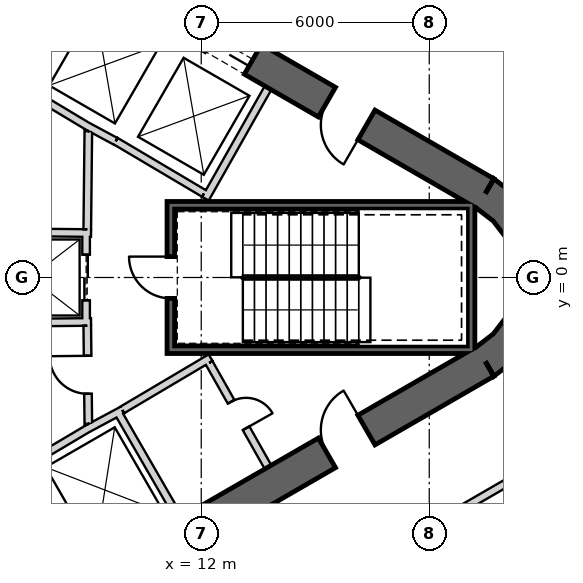
"""IFC4 building model, lengths in metres.
Left out: names, types, materials, properties, quantities, classifications, styles, units other than length and angle.
Written with IfcOpenShell. Run it as: python <this file> out.ifc"""

import sys

from ifc_helpers import new_model, si_unit, direction, frame, frame_2d, origin, place, context, subcontext, project, spatial, polyline, rectangle, outline, extrude, element, fill, save


model = new_model("IFC4")
c1 = context("Model", 3, precision=1e-05, world=origin(), true_north=direction((0.0, 1.0)))
c2 = subcontext(c1, "Body", "Model", "MODEL_VIEW")
j1 = project(units=[si_unit("LENGTHUNIT", "METRE"), si_unit("PLANEANGLEUNIT", "RADIAN")], contexts=[c1])
p1 = place(None, origin())
s1 = spatial("IfcSite", under=j1, at=p1, CompositionType="ELEMENT")
p2 = place(p1, origin())
s2 = spatial("IfcBuilding", under=s1, at=p2, CompositionType="ELEMENT")
p3 = place(p2, frame((0.0, 0.0, 119.3)))
s3 = spatial("IfcBuildingStorey", under=s2, at=p3, CompositionType="ELEMENT", Elevation=119.3)
p4 = place(p3, frame((19.475, 2.208, 0.0), z_axis=(0.0, 0.0, 1.0), x_axis=(-0.866028369851, 0.499994862586, 0.0)))
e1 = element("IfcWall", 1, at=p4, inside=s3, PredefinedType="SHEAR", context=c2, shape_type="SweptSolid", body=[
    extrude(rectangle(XDim=31.523, YDim=0.9, at=frame_2d((15.762, 0.0))), origin(), (0.0, 0.0, 1.0), 4.1),
])
p5 = place(p4, frame((7.062, 0.0, 0.0)))
e2 = element("IfcOpeningElement", 2, at=p5, cuts=e1, PredefinedType="OPENING", context=c2, shape_type="SweptSolid", body=[
    extrude(rectangle(XDim=1.2, YDim=2.4, at=frame_2d((0.6, 1.2))), frame((0.0, 0.46, 0.0), z_axis=(0.0, -1.0, 0.0), x_axis=(1.0, 0.0, 0.0)), (0.0, 0.0, 1.0), 0.92),
])
p6 = place(p4, frame((9.762, 0.0, 0.0)))
e3 = element("IfcOpeningElement", 3, at=p6, cuts=e1, PredefinedType="OPENING", context=c2, shape_type="SweptSolid", body=[
    extrude(rectangle(XDim=1.2, YDim=2.4, at=frame_2d((0.6, 1.2))), frame((0.0, 0.46, 0.0), z_axis=(0.0, -1.0, 0.0), x_axis=(1.0, 0.0, 0.0)), (0.0, 0.0, 1.0), 0.92),
])
p7 = place(p4, frame((12.462, 0.0, 0.0)))
e4 = element("IfcOpeningElement", 4, at=p7, cuts=e1, PredefinedType="OPENING", context=c2, shape_type="SweptSolid", body=[
    extrude(rectangle(XDim=1.2, YDim=2.4, at=frame_2d((0.6, 1.2))), frame((0.0, 0.46, 0.0), z_axis=(0.0, -1.0, 0.0), x_axis=(1.0, 0.0, 0.0)), (0.0, 0.0, 1.0), 0.92),
])
p8 = place(p4, frame((15.162, 0.0, 0.0)))
e5 = element("IfcOpeningElement", 5, at=p8, cuts=e1, PredefinedType="OPENING", context=c2, shape_type="SweptSolid", body=[
    extrude(rectangle(XDim=1.2, YDim=2.4, at=frame_2d((0.6, 1.2))), frame((0.0, 0.46, 0.0), z_axis=(0.0, -1.0, 0.0), x_axis=(1.0, 0.0, 0.0)), (0.0, 0.0, 1.0), 0.92),
])
p9 = place(p4, frame((17.862, 0.0, 0.0)))
e6 = element("IfcOpeningElement", 6, at=p9, cuts=e1, PredefinedType="OPENING", context=c2, shape_type="SweptSolid", body=[
    extrude(rectangle(XDim=1.2, YDim=2.4, at=frame_2d((0.6, 1.2))), frame((0.0, 0.46, 0.0), z_axis=(0.0, -1.0, 0.0), x_axis=(1.0, 0.0, 0.0)), (0.0, 0.0, 1.0), 0.92),
])
p10 = place(p4, frame((20.562, 0.0, 0.0)))
e7 = element("IfcOpeningElement", 7, at=p10, cuts=e1, PredefinedType="OPENING", context=c2, shape_type="SweptSolid", body=[
    extrude(rectangle(XDim=1.2, YDim=2.4, at=frame_2d((0.6, 1.2))), frame((0.0, 0.46, 0.0), z_axis=(0.0, -1.0, 0.0), x_axis=(1.0, 0.0, 0.0)), (0.0, 0.0, 1.0), 0.92),
])
p11 = place(p4, frame((23.262, 0.0, 0.0)))
e8 = element("IfcOpeningElement", 8, at=p11, cuts=e1, PredefinedType="OPENING", context=c2, shape_type="SweptSolid", body=[
    extrude(rectangle(XDim=1.2, YDim=2.4, at=frame_2d((0.6, 1.2))), frame((0.0, 0.46, 0.0), z_axis=(0.0, -1.0, 0.0), x_axis=(1.0, 0.0, 0.0)), (0.0, 0.0, 1.0), 0.92),
])
p12 = place(p4, frame((3.612, 0.0, 0.0)))
e9 = element("IfcOpeningElement", 9, at=p12, cuts=e1, PredefinedType="OPENING", context=c2, shape_type="SweptSolid", body=[
    extrude(rectangle(XDim=1.2, YDim=2.4, at=frame_2d((0.6, 1.2))), frame((0.0, 0.46, 0.0), z_axis=(0.0, -1.0, 0.0), x_axis=(1.0, 0.0, 0.0)), (0.0, 0.0, 1.0), 0.92),
])
p13 = place(p4, frame((26.712, 0.0, 0.0)))
e10 = element("IfcOpeningElement", 10, at=p13, cuts=e1, PredefinedType="OPENING", context=c2, shape_type="SweptSolid", body=[
    extrude(rectangle(XDim=1.2, YDim=2.4, at=frame_2d((0.6, 1.2))), frame((0.0, 0.46, 0.0), z_axis=(0.0, -1.0, 0.0), x_axis=(1.0, 0.0, 0.0)), (0.0, 0.0, 1.0), 0.92),
])
p14 = place(p3, frame((-7.825, -17.97, 0.0), z_axis=(0.0, 0.0, 1.0), x_axis=(0.866028369851, 0.499994862586, 0.0)))
e11 = element("IfcWall", 11, at=p14, inside=s3, PredefinedType="SHEAR", context=c2, shape_type="SweptSolid", body=[
    extrude(rectangle(XDim=31.523, YDim=0.9, at=frame_2d((15.762, 0.0))), origin(), (0.0, 0.0, 1.0), 4.1),
])
p15 = place(p14, frame((7.062, 0.0, 0.0)))
e12 = element("IfcOpeningElement", 12, at=p15, cuts=e11, PredefinedType="OPENING", context=c2, shape_type="SweptSolid", body=[
    extrude(rectangle(XDim=1.2, YDim=2.4, at=frame_2d((0.6, 1.2))), frame((0.0, 0.46, 0.0), z_axis=(0.0, -1.0, 0.0), x_axis=(1.0, 0.0, 0.0)), (0.0, 0.0, 1.0), 0.92),
])
p16 = place(p14, frame((9.762, 0.0, 0.0)))
e13 = element("IfcOpeningElement", 13, at=p16, cuts=e11, PredefinedType="OPENING", context=c2, shape_type="SweptSolid", body=[
    extrude(rectangle(XDim=1.2, YDim=2.4, at=frame_2d((0.6, 1.2))), frame((0.0, 0.46, 0.0), z_axis=(0.0, -1.0, 0.0), x_axis=(1.0, 0.0, 0.0)), (0.0, 0.0, 1.0), 0.92),
])
p17 = place(p14, frame((12.462, 0.0, 0.0)))
e14 = element("IfcOpeningElement", 14, at=p17, cuts=e11, PredefinedType="OPENING", context=c2, shape_type="SweptSolid", body=[
    extrude(rectangle(XDim=1.2, YDim=2.4, at=frame_2d((0.6, 1.2))), frame((0.0, 0.46, 0.0), z_axis=(0.0, -1.0, 0.0), x_axis=(1.0, 0.0, 0.0)), (0.0, 0.0, 1.0), 0.92),
])
p18 = place(p14, frame((15.162, 0.0, 0.0)))
e15 = element("IfcOpeningElement", 15, at=p18, cuts=e11, PredefinedType="OPENING", context=c2, shape_type="SweptSolid", body=[
    extrude(rectangle(XDim=1.2, YDim=2.4, at=frame_2d((0.6, 1.2))), frame((0.0, 0.46, 0.0), z_axis=(0.0, -1.0, 0.0), x_axis=(1.0, 0.0, 0.0)), (0.0, 0.0, 1.0), 0.92),
])
p19 = place(p14, frame((17.862, 0.0, 0.0)))
e16 = element("IfcOpeningElement", 16, at=p19, cuts=e11, PredefinedType="OPENING", context=c2, shape_type="SweptSolid", body=[
    extrude(rectangle(XDim=1.2, YDim=2.4, at=frame_2d((0.6, 1.2))), frame((0.0, 0.46, 0.0), z_axis=(0.0, -1.0, 0.0), x_axis=(1.0, 0.0, 0.0)), (0.0, 0.0, 1.0), 0.92),
])
p20 = place(p14, frame((20.562, 0.0, 0.0)))
e17 = element("IfcOpeningElement", 17, at=p20, cuts=e11, PredefinedType="OPENING", context=c2, shape_type="SweptSolid", body=[
    extrude(rectangle(XDim=1.2, YDim=2.4, at=frame_2d((0.6, 1.2))), frame((0.0, 0.46, 0.0), z_axis=(0.0, -1.0, 0.0), x_axis=(1.0, 0.0, 0.0)), (0.0, 0.0, 1.0), 0.92),
])
p21 = place(p14, frame((26.712, 0.0, 0.0)))
e18 = element("IfcOpeningElement", 18, at=p21, cuts=e11, PredefinedType="OPENING", context=c2, shape_type="SweptSolid", body=[
    extrude(rectangle(XDim=1.2, YDim=2.4, at=frame_2d((0.6, 1.2))), frame((0.0, 0.46, 0.0), z_axis=(0.0, -1.0, 0.0), x_axis=(1.0, 0.0, 0.0)), (0.0, 0.0, 1.0), 0.92),
])
p22 = place(p14, frame((3.612, 0.0, 0.0)))
e19 = element("IfcOpeningElement", 19, at=p22, cuts=e11, PredefinedType="OPENING", context=c2, shape_type="SweptSolid", body=[
    extrude(rectangle(XDim=1.2, YDim=2.4, at=frame_2d((0.6, 1.2))), frame((0.0, 0.46, 0.0), z_axis=(0.0, -1.0, 0.0), x_axis=(1.0, 0.0, 0.0)), (0.0, 0.0, 1.0), 0.92),
])
p23 = place(p3, origin())
e20 = element("IfcWall", 20, at=p23, inside=s3, PredefinedType="SHEAR", context=c2, shape_type="SweptSolid", body=[
    extrude(outline(polyline([(19.7, -2.598), (20.321, -2.121), (20.798, -1.5), (21.098, -0.777), (21.2, 0.0), (21.098, 0.777), (20.798, 1.5), (20.321, 2.121), (19.7, 2.598), (19.25, 1.819), (19.685, 1.485), (20.019, 1.05), (20.229, 0.543), (20.3, 0.0), (20.229, -0.543), (20.019, -1.05), (19.685, -1.485), (19.25, -1.819), (19.7, -2.598)])), origin(), (0.0, 0.0, 1.0), 4.1),
])
p24 = place(p3, frame((12.11, 2.073, 0.0), z_axis=(0.0, 0.0, 1.0), x_axis=(0.49196600604, 0.870614408852, 0.0)))
e21 = element("IfcWall", 21, at=p24, inside=s3, PredefinedType="PLUMBINGWALL", context=c2, shape_type="SweptSolid", body=[
    extrude(rectangle(XDim=3.35, YDim=0.2, at=frame_2d((1.675, 0.0))), origin(), (0.0, 0.0, 1.0), 3.8),
])
p25 = place(p3, frame((12.073, 2.211, 0.0), z_axis=(0.0, 0.0, 1.0), x_axis=(-0.860438357912, 0.509554542943, 0.0)))
e22 = element("IfcWall", 22, at=p25, inside=s3, PredefinedType="PLUMBINGWALL", context=c2, shape_type="SweptSolid", body=[
    extrude(rectangle(XDim=2.7, YDim=0.2, at=frame_2d((1.35, 0.0))), origin(), (0.0, 0.0, 1.0), 3.8),
])
p26 = place(p3, frame((9.748, 3.583, 0.0), z_axis=(0.0, 0.0, 1.0), x_axis=(-0.880917147855, 0.473270513147, 0.0)))
e23 = element("IfcWall", 23, at=p26, inside=s3, PredefinedType="PLUMBINGWALL", context=c2, shape_type="SweptSolid", body=[
    extrude(rectangle(XDim=0.878, YDim=0.2, at=frame_2d((0.439, 0.0))), origin(), (0.0, 0.0, 1.0), 3.8),
])
p27 = place(p3, frame((9.079, 3.937, 0.0), z_axis=(0.0, 0.0, 1.0), x_axis=(-0.857516281273, 0.51445682749, 0.0)))
e24 = element("IfcWall", 24, at=p27, inside=s3, PredefinedType="PLUMBINGWALL", context=c2, shape_type="SweptSolid", body=[
    extrude(rectangle(XDim=1.845, YDim=0.2, at=frame_2d((0.922, 0.0))), origin(), (0.0, 0.0, 1.0), 3.8),
])
p28 = place(p3, frame((9.795, -3.525, 0.0), z_axis=(0.0, 0.0, 1.0), x_axis=(0.499984717929, -0.866034226713, 0.0)))
e25 = element("IfcWall", 25, at=p28, inside=s3, PredefinedType="PLUMBINGWALL", context=c2, shape_type="SweptSolid", body=[
    extrude(rectangle(XDim=3.25, YDim=0.2, at=frame_2d((1.625, 0.0))), origin(), (0.0, 0.0, 1.0), 3.8),
])
p29 = place(p3, frame((8.974, -3.999, 0.0), z_axis=(0.0, 0.0, 1.0), x_axis=(0.880907015104, 0.473289373154, 0.0)))
e26 = element("IfcWall", 26, at=p29, inside=s3, PredefinedType="PLUMBINGWALL", context=c2, shape_type="SweptSolid", body=[
    extrude(rectangle(XDim=1.078, YDim=0.2, at=frame_2d((0.539, 0.0))), origin(), (0.0, 0.0, 1.0), 3.8),
])
p30 = place(p3, frame((7.493, -4.878, 0.0), z_axis=(0.0, 0.0, 1.0), x_axis=(0.859981807212, 0.510324691999, 0.0)))
e27 = element("IfcWall", 27, at=p30, inside=s3, PredefinedType="PLUMBINGWALL", context=c2, shape_type="SweptSolid", body=[
    extrude(rectangle(XDim=1.845, YDim=0.2, at=frame_2d((0.922, 0.0))), origin(), (0.0, 0.0, 1.0), 3.8),
])
p31 = place(p3, frame((19.2, 1.9, -0.3), z_axis=(0.0, 0.0, 1.0), x_axis=(-1.0, 0.0, 0.0)))
e28 = element("IfcWall", 28, at=p31, inside=s3, PredefinedType="SHEAR", context=c2, shape_type="SweptSolid", body=[
    extrude(rectangle(XDim=8.1, YDim=0.2, at=frame_2d((4.05, 0.0))), origin(), (0.0, 0.0, 1.0), 4.1),
])
p32 = place(p3, frame((19.1, -2.0, -0.3), z_axis=(0.0, 0.0, 1.0), x_axis=(0.0, 1.0, 0.0)))
e29 = element("IfcWall", 29, at=p32, inside=s3, PredefinedType="SHEAR", context=c2, shape_type="SweptSolid", body=[
    extrude(rectangle(XDim=3.8, YDim=0.2, at=frame_2d((1.9, 0.0))), origin(), (0.0, 0.0, 1.0), 4.1),
])
p33 = place(p3, frame((11.1, -1.9, -0.3), z_axis=(0.0, 0.0, 1.0), x_axis=(1.0, 0.0, 0.0)))
e30 = element("IfcWall", 30, at=p33, inside=s3, PredefinedType="SHEAR", context=c2, shape_type="SweptSolid", body=[
    extrude(rectangle(XDim=7.9, YDim=0.2, at=frame_2d((3.95, 0.0))), origin(), (0.0, 0.0, 1.0), 4.1),
])
p34 = place(p3, frame((11.2, -1.8, -0.3), z_axis=(0.0, 0.0, 1.0), x_axis=(0.0, 1.0, 0.0)))
e31 = element("IfcWall", 31, at=p34, inside=s3, PredefinedType="SHEAR", context=c2, shape_type="SweptSolid", body=[
    extrude(rectangle(XDim=3.6, YDim=0.2, at=frame_2d((1.8, 0.0))), origin(), (0.0, 0.0, 1.0), 4.1),
])
p35 = place(p34, frame((1.25, 0.0, 0.3)))
e32 = element("IfcOpeningElement", 32, at=p35, cuts=e31, PredefinedType="OPENING", context=c2, shape_type="SweptSolid", body=[
    extrude(rectangle(XDim=1.1, YDim=2.1, at=frame_2d((0.55, 1.05))), frame((0.0, 0.11, 0.0), z_axis=(0.0, -1.0, 0.0), x_axis=(1.0, 0.0, 0.0)), (0.0, 0.0, 1.0), 0.22),
])
p36 = place(p3, frame((8.97, 1.2, 0.0), z_axis=(0.0, 0.0, 1.0), x_axis=(0.0, -1.0, 0.0)))
e33 = element("IfcWall", 33, at=p36, inside=s3, PredefinedType="PLUMBINGWALL", context=c2, shape_type="SweptSolid", body=[
    extrude(rectangle(XDim=2.4, YDim=0.2, at=frame_2d((1.2, 0.0))), origin(), (0.0, 0.0, 1.0), 3.8),
])
p37 = place(p36, frame((0.6, 0.0, 0.0)))
e34 = element("IfcOpeningElement", 34, at=p37, cuts=e33, PredefinedType="OPENING", context=c2, shape_type="SweptSolid", body=[
    extrude(rectangle(XDim=1.2, YDim=2.4, at=frame_2d((0.6, 1.2))), frame((0.0, 0.11, 0.0), z_axis=(0.0, -1.0, 0.0), x_axis=(1.0, 0.0, 0.0)), (0.0, 0.0, 1.0), 0.22),
])
p38 = place(p3, frame((6.0, 1.2, 0.0), z_axis=(0.0, 0.0, 1.0), x_axis=(0.999949988, -0.010001074852, 0.0)))
e35 = element("IfcWall", 35, at=p38, inside=s3, PredefinedType="PLUMBINGWALL", context=c2, shape_type="SweptSolid", body=[
    extrude(rectangle(XDim=3.1, YDim=0.2, at=frame_2d((1.55, 0.0))), origin(), (0.0, 0.0, 1.0), 3.8),
])
p39 = place(p3, frame((5.9, -1.201, 0.0), z_axis=(0.0, 0.0, 1.0), x_axis=(0.999950064753, 0.009993397809, 0.0)))
e36 = element("IfcWall", 36, at=p39, inside=s3, PredefinedType="PLUMBINGWALL", context=c2, shape_type="SweptSolid", body=[
    extrude(rectangle(XDim=3.2, YDim=0.2, at=frame_2d((1.6, 0.0))), origin(), (0.0, 0.0, 1.0), 3.8),
])
p40 = place(p3, frame((12.245, -2.109, 0.0), z_axis=(0.0, 0.0, 1.0), x_axis=(-0.860414880418, -0.509594185166, 0.0)))
e37 = element("IfcWall", 37, at=p40, inside=s3, PredefinedType="PARTITIONING", context=c2, shape_type="SweptSolid", body=[
    extrude(rectangle(XDim=2.7, YDim=0.2, at=frame_2d((1.35, 0.0))), origin(), (0.0, 0.0, 1.0), 3.8),
])
p41 = place(p3, frame((13.758, -4.99, 0.0), z_axis=(0.0, 0.0, 1.0), x_axis=(-0.491993409184, 0.87059892334, 0.0)))
e38 = element("IfcWall", 38, at=p41, inside=s3, PredefinedType="PARTITIONING", context=c2, shape_type="SweptSolid", body=[
    extrude(rectangle(XDim=3.15, YDim=0.2, at=frame_2d((1.575, 0.0))), origin(), (0.0, 0.0, 1.0), 3.8),
])
p42 = place(p41, frame((1.175, 0.0, 0.0)))
e39 = element("IfcOpeningElement", 39, at=p42, cuts=e38, PredefinedType="OPENING", context=c2, shape_type="SweptSolid", body=[
    extrude(rectangle(XDim=0.8, YDim=2.1, at=frame_2d((0.4, 1.05))), frame((0.0, 0.11, 0.0), z_axis=(0.0, -1.0, 0.0), x_axis=(1.0, 0.0, 0.0)), (0.0, 0.0, 1.0), 0.22),
])
p43 = place(p3, frame((9.001, 1.27, 0.0), z_axis=(0.0, 0.0, 1.0), x_axis=(0.010784614026, 0.999941844359, 0.0)))
e40 = element("IfcWall", 40, at=p43, inside=s3, PredefinedType="PARTITIONING", context=c2, shape_type="SweptSolid", body=[
    extrude(rectangle(XDim=2.581, YDim=0.2, at=frame_2d((1.291, 0.0))), origin(), (0.0, 0.0, 1.0), 3.8),
])
p44 = place(p3, frame((9.029, -3.851, 0.0), z_axis=(0.0, 0.0, 1.0), x_axis=(-0.010783593937, 0.99994185536, 0.0)))
e41 = element("IfcWall", 41, at=p44, inside=s3, PredefinedType="PARTITIONING", context=c2, shape_type="SweptSolid", body=[
    extrude(rectangle(XDim=2.581, YDim=0.2, at=frame_2d((1.291, 0.0))), origin(), (0.0, 0.0, 1.0), 3.8),
])
p45 = place(p44, frame((0.791, 0.0, 0.0)))
e42 = element("IfcOpeningElement", 42, at=p45, cuts=e41, PredefinedType="OPENING", context=c2, shape_type="SweptSolid", body=[
    extrude(rectangle(XDim=1.0, YDim=2.1, at=frame_2d((0.5, 1.05))), frame((0.0, 0.11, 0.0), z_axis=(0.0, -1.0, 0.0), x_axis=(1.0, 0.0, 0.0)), (0.0, 0.0, 1.0), 0.22),
])
p46 = place(p3, frame((22.727, 5.931, 0.0), z_axis=(0.0, 0.0, 1.0), x_axis=(-0.866024609098, 0.500001376435, 0.0)))
e43 = element("IfcWall", 43, at=p46, inside=s3, PredefinedType="PARTITIONING", context=c2, shape_type="SweptSolid", body=[
    extrude(rectangle(XDim=26.847, YDim=0.2, at=frame_2d((13.424, 0.0))), origin(), (0.0, 0.0, 1.0), 2.98),
])
p47 = place(p46, frame((16.578, 0.0, 0.0)))
e44 = element("IfcOpeningElement", 44, at=p47, cuts=e43, PredefinedType="OPENING", context=c2, shape_type="SweptSolid", body=[
    extrude(rectangle(XDim=1.0, YDim=2.1, at=frame_2d((0.5, 1.05))), frame((0.0, 0.11, 0.0), z_axis=(0.0, -1.0, 0.0), x_axis=(1.0, 0.0, 0.0)), (0.0, 0.0, 1.0), 0.22),
])
p48 = place(p46, frame((4.829, 0.0, 0.0)))
e45 = element("IfcOpeningElement", 45, at=p48, cuts=e43, PredefinedType="OPENING", context=c2, shape_type="SweptSolid", body=[
    extrude(rectangle(XDim=1.0, YDim=2.1, at=frame_2d((0.5, 1.05))), frame((0.0, 0.11, 0.0), z_axis=(0.0, -1.0, 0.0), x_axis=(1.0, 0.0, 0.0)), (0.0, 0.0, 1.0), 0.22),
])
p49 = place(p3, frame((-6.852, -20.93, 0.0), z_axis=(0.0, 0.0, 1.0), x_axis=(0.866023703603, 0.500002944789, 0.0)))
e46 = element("IfcWall", 46, at=p49, inside=s3, PredefinedType="PARTITIONING", context=c2, shape_type="SweptSolid", body=[
    extrude(rectangle(XDim=32.599, YDim=0.2, at=frame_2d((16.299, 0.0))), origin(), (0.0, 0.0, 1.0), 2.98),
])
p50 = place(p49, frame((27.463, 0.0, 0.0)))
e47 = element("IfcOpeningElement", 47, at=p50, cuts=e46, PredefinedType="OPENING", context=c2, shape_type="SweptSolid", body=[
    extrude(rectangle(XDim=1.0, YDim=2.1, at=frame_2d((0.5, 1.05))), frame((0.0, 0.11, 0.0), z_axis=(0.0, -1.0, 0.0), x_axis=(1.0, 0.0, 0.0)), (0.0, 0.0, 1.0), 0.22),
])
p51 = place(p49, frame((16.307, 0.0, 0.0)))
e48 = element("IfcOpeningElement", 48, at=p51, cuts=e46, PredefinedType="OPENING", context=c2, shape_type="SweptSolid", body=[
    extrude(rectangle(XDim=1.0, YDim=2.1, at=frame_2d((0.5, 1.05))), frame((0.0, 0.11, 0.0), z_axis=(0.0, -1.0, 0.0), x_axis=(1.0, 0.0, 0.0)), (0.0, 0.0, 1.0), 0.22),
])
p52 = place(p49, frame((4.694, 0.0, 0.0)))
e49 = element("IfcOpeningElement", 49, at=p52, cuts=e46, PredefinedType="OPENING", context=c2, shape_type="SweptSolid", body=[
    extrude(rectangle(XDim=1.0, YDim=2.1, at=frame_2d((0.5, 1.05))), frame((0.0, 0.11, 0.0), z_axis=(0.0, -1.0, 0.0), x_axis=(1.0, 0.0, 0.0)), (0.0, 0.0, 1.0), 0.22),
])
p53 = place(p35, origin())
e50 = element("IfcDoor", 50, at=p53, inside=s3, OperationType="SINGLE_SWING_RIGHT", PredefinedType="USERDEFINED", context=c2, shape_type="SweptSolid", body=[
    extrude(rectangle(XDim=1.1, YDim=2.1, at=frame_2d((0.55, 1.05))), frame((0.0, 0.025, 0.0), z_axis=(0.0, -1.0, 0.0), x_axis=(1.0, 0.0, 0.0)), (0.0, 0.0, 1.0), 0.05),
])
fill(e32, e50)
p54 = place(p45, origin())
e51 = element("IfcDoor", 51, at=p54, inside=s3, OperationType="SINGLE_SWING_RIGHT", PredefinedType="USERDEFINED", context=c2, shape_type="SweptSolid", body=[
    extrude(rectangle(XDim=1.0, YDim=2.1, at=frame_2d((0.5, 1.05))), frame((0.0, 0.025, 0.0), z_axis=(0.0, -1.0, 0.0), x_axis=(1.0, 0.0, 0.0)), (0.0, 0.0, 1.0), 0.05),
])
fill(e42, e51)
p55 = place(p37, origin())
e52 = element("IfcDoor", 52, at=p55, inside=s3, OperationType="SLIDING_TO_LEFT", PredefinedType="USERDEFINED", context=c2, shape_type="SweptSolid", body=[
    extrude(rectangle(XDim=1.2, YDim=2.4, at=frame_2d((0.6, 1.2))), frame((0.0, 0.025, 0.0), z_axis=(0.0, -1.0, 0.0), x_axis=(1.0, 0.0, 0.0)), (0.0, 0.0, 1.0), 0.05),
])
fill(e34, e52)
p56 = place(p42, origin())
e53 = element("IfcDoor", 53, at=p56, inside=s3, OperationType="SINGLE_SWING_LEFT", PredefinedType="USERDEFINED", context=c2, shape_type="SweptSolid", body=[
    extrude(rectangle(XDim=0.8, YDim=2.1, at=frame_2d((0.4, 1.05))), frame((0.0, 0.025, 0.0), z_axis=(0.0, -1.0, 0.0), x_axis=(1.0, 0.0, 0.0)), (0.0, 0.0, 1.0), 0.05),
])
fill(e39, e53)
p57 = place(p5, origin())
e54 = element("IfcDoor", 54, at=p57, inside=s3, OperationType="SLIDING_TO_LEFT", PredefinedType="USERDEFINED", context=c2, shape_type="SweptSolid", body=[
    extrude(rectangle(XDim=1.2, YDim=2.4, at=frame_2d((0.6, 1.2))), frame((0.0, 0.025, 0.0), z_axis=(0.0, -1.0, 0.0), x_axis=(1.0, 0.0, 0.0)), (0.0, 0.0, 1.0), 0.05),
])
fill(e2, e54)
p58 = place(p21, origin())
e55 = element("IfcDoor", 55, at=p58, inside=s3, OperationType="SINGLE_SWING_LEFT", PredefinedType="USERDEFINED", context=c2, shape_type="SweptSolid", body=[
    extrude(rectangle(XDim=1.2, YDim=2.4, at=frame_2d((0.6, 1.2))), frame((0.0, 0.025, 0.0), z_axis=(0.0, -1.0, 0.0), x_axis=(1.0, 0.0, 0.0)), (0.0, 0.0, 1.0), 0.05),
])
fill(e18, e55)
p59 = place(p12, origin())
e56 = element("IfcDoor", 56, at=p59, inside=s3, OperationType="SINGLE_SWING_RIGHT", PredefinedType="USERDEFINED", context=c2, shape_type="SweptSolid", body=[
    extrude(rectangle(XDim=1.2, YDim=2.4, at=frame_2d((0.6, 1.2))), frame((0.0, 0.025, 0.0), z_axis=(0.0, -1.0, 0.0), x_axis=(1.0, 0.0, 0.0)), (0.0, 0.0, 1.0), 0.05),
])
fill(e9, e56)
save(model, sys.argv[1])
